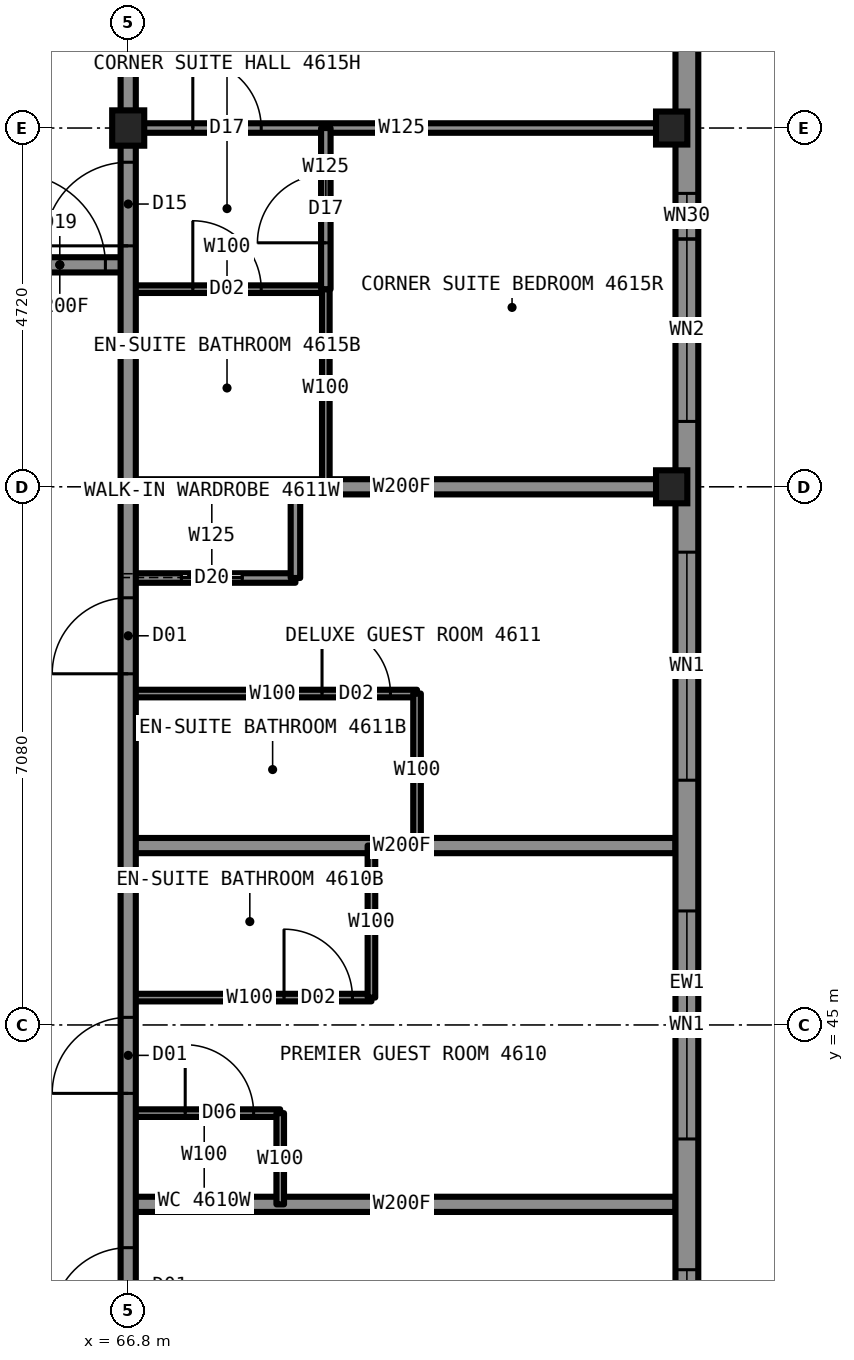
"""IFC4 building model, lengths in metres.
Left out: names, types, materials, properties, quantities, classifications, styles, units other than length and angle.
Written with IfcOpenShell. Run it as: python <this file> out.ifc"""

import sys

from ifc_helpers import new_model, si_unit, direction, frame, frame_2d, origin, origin_2d, place, context, subcontext, project, spatial, rectangle, i_section, extrude, element, fill, save


model = new_model("IFC4")
c1 = context("Model", 3, precision=1e-05, world=origin(), true_north=direction((0.0, 1.0)))
c2 = subcontext(c1, "Body", "Model", "MODEL_VIEW")
j1 = project(units=[si_unit("LENGTHUNIT", "METRE"), si_unit("PLANEANGLEUNIT", "RADIAN")], contexts=[c1])
p1 = place(None, origin())
s1 = spatial("IfcSite", under=j1, at=p1, CompositionType="ELEMENT")
p2 = place(p1, origin())
s2 = spatial("IfcBuilding", under=s1, at=p2, CompositionType="ELEMENT")
p3 = place(p2, frame((0.0, 0.0, 172.3)))
s3 = spatial("IfcBuildingStorey", under=s2, at=p3, CompositionType="ELEMENT", Elevation=172.3)
for number, where, z_axis, x_axis in (
    (1, (73.95, 52.08, 0.0), (0.0, 0.0, 1.0), (1.0, 0.0, 0.0)),
    (2, (73.95, 56.8, 0.0), (0.0, 0.0, 1.0), (1.0, 0.0, 0.0)),
):
    element("IfcColumn", number, at=place(p3, frame(where, z_axis=z_axis, x_axis=x_axis)), inside=s3, PredefinedType="COLUMN", context=c2, shape_type="SweptSolid", body=[
        extrude(i_section(OverallWidth=0.411, OverallDepth=0.434, WebThickness=0.036, FlangeThickness=0.057, at=origin_2d()), origin(), (0.0, 0.0, 1.0), 3.5),
    ])
p4 = place(p3, frame((66.8, 56.8, 0.0), z_axis=(0.0, 0.0, 1.0), x_axis=(1.0, 0.0, 0.0)))
e3 = element("IfcColumn", 3, at=p4, inside=s3, PredefinedType="COLUMN", context=c2, shape_type="SweptSolid", body=[
    extrude(i_section(OverallWidth=0.422, OverallDepth=0.465, WebThickness=0.045, FlangeThickness=0.073, at=origin_2d()), origin(), (0.0, 0.0, 1.0), 3.5),
])
p5 = place(p3, frame((66.8, 43.84, 0.0), z_axis=(0.0, 0.0, 1.0), x_axis=(1.0, 0.0, 0.0)))
e4 = element("IfcWall", 4, at=p5, inside=s3, PredefinedType="PARTITIONING", context=c2, shape_type="SweptSolid", body=[
    extrude(rectangle(XDim=2.0, YDim=0.1, at=frame_2d((1.0, 0.0))), origin(), (0.0, 0.0, 1.0), 3.33),
])
p6 = place(p5, frame((0.75, 0.0, 0.0)))
e5 = element("IfcOpeningElement", 5, at=p6, cuts=e4, PredefinedType="OPENING", context=c2, shape_type="SweptSolid", body=[
    extrude(rectangle(XDim=0.9, YDim=2.1, at=frame_2d((0.45, 1.05))), frame((0.0, 0.06, 0.0), z_axis=(0.0, -1.0, 0.0), x_axis=(1.0, 0.0, 0.0)), (0.0, 0.0, 1.0), 0.12),
])
p7 = place(p3, frame((66.8, 42.64, 0.0), z_axis=(0.0, 0.0, 1.0), x_axis=(1.0, 0.0, 0.0)))
e6 = element("IfcWall", 6, at=p7, inside=s3, PredefinedType="PARTITIONING", context=c2, shape_type="SweptSolid", body=[
    extrude(rectangle(XDim=7.2, YDim=0.2, at=frame_2d((3.6, 0.0))), origin(), (0.0, 0.0, 1.0), 2.73),
])
p8 = place(p3, frame((66.8, 45.36, 0.0), z_axis=(0.0, 0.0, 1.0), x_axis=(1.0, 0.0, 0.0)))
e7 = element("IfcWall", 7, at=p8, inside=s3, PredefinedType="PARTITIONING", context=c2, shape_type="SweptSolid", body=[
    extrude(rectangle(XDim=3.2, YDim=0.1, at=frame_2d((1.6, 0.0))), origin(), (0.0, 0.0, 1.0), 3.33),
])
p9 = place(p8, frame((2.05, 0.0, 0.0)))
e8 = element("IfcOpeningElement", 8, at=p9, cuts=e7, PredefinedType="OPENING", context=c2, shape_type="SweptSolid", body=[
    extrude(rectangle(XDim=0.9, YDim=2.1, at=frame_2d((0.45, 1.05))), frame((0.0, 0.06, 0.0), z_axis=(0.0, -1.0, 0.0), x_axis=(1.0, 0.0, 0.0)), (0.0, 0.0, 1.0), 0.12),
])
p10 = place(p3, frame((65.0, 55.0, 0.0), z_axis=(0.0, 0.0, 1.0), x_axis=(1.0, 0.0, 0.0)))
e9 = element("IfcWall", 9, at=p10, inside=s3, PredefinedType="PARTITIONING", context=c2, shape_type="SweptSolid", body=[
    extrude(rectangle(XDim=1.8, YDim=0.2, at=frame_2d((0.9, 0.0))), origin(), (0.0, 0.0, 1.0), 3.33),
])
p11 = place(p10, frame((0.3, 0.0, 0.0)))
e10 = element("IfcOpeningElement", 10, at=p11, cuts=e9, PredefinedType="OPENING", context=c2, shape_type="SweptSolid", body=[
    extrude(rectangle(XDim=1.2, YDim=2.2, at=frame_2d((0.6, 1.1))), frame((0.0, 0.11, 0.0), z_axis=(0.0, -1.0, 0.0), x_axis=(1.0, 0.0, 0.0)), (0.0, 0.0, 1.0), 0.22),
])
p12 = place(p3, frame((66.8, 56.8, 0.0), z_axis=(0.0, 0.0, 1.0), x_axis=(1.0, 0.0, 0.0)))
e11 = element("IfcWall", 11, at=p12, inside=s3, PredefinedType="PARTITIONING", context=c2, shape_type="SweptSolid", body=[
    extrude(rectangle(XDim=7.2, YDim=0.125, at=frame_2d((3.6, 0.0))), origin(), (0.0, 0.0, 1.0), 2.573),
])
p13 = place(p12, frame((0.85, 0.0, 0.0)))
e12 = element("IfcOpeningElement", 12, at=p13, cuts=e11, PredefinedType="OPENING", context=c2, shape_type="SweptSolid", body=[
    extrude(rectangle(XDim=0.9, YDim=2.2, at=frame_2d((0.45, 1.1))), frame((0.0, 0.073, 0.0), z_axis=(0.0, -1.0, 0.0), x_axis=(1.0, 0.0, 0.0)), (0.0, 0.0, 1.0), 0.145),
])
p14 = place(p3, frame((66.8, 47.36, 0.0), z_axis=(0.0, 0.0, 1.0), x_axis=(1.0, 0.0, 0.0)))
e13 = element("IfcWall", 13, at=p14, inside=s3, PredefinedType="PARTITIONING", context=c2, shape_type="SweptSolid", body=[
    extrude(rectangle(XDim=7.2, YDim=0.2, at=frame_2d((3.6, 0.0))), origin(), (0.0, 0.0, 1.0), 2.73),
])
p15 = place(p3, frame((66.8, 49.36, 0.0), z_axis=(0.0, 0.0, 1.0), x_axis=(1.0, 0.0, 0.0)))
e14 = element("IfcWall", 14, at=p15, inside=s3, PredefinedType="PARTITIONING", context=c2, shape_type="SweptSolid", body=[
    extrude(rectangle(XDim=3.8, YDim=0.1, at=frame_2d((1.9, 0.0))), origin(), (0.0, 0.0, 1.0), 3.33),
])
p16 = place(p15, frame((2.55, 0.0, 0.0)))
e15 = element("IfcOpeningElement", 15, at=p16, cuts=e14, PredefinedType="OPENING", context=c2, shape_type="SweptSolid", body=[
    extrude(rectangle(XDim=0.9, YDim=2.1, at=frame_2d((0.45, 1.05))), frame((0.0, 0.06, 0.0), z_axis=(0.0, -1.0, 0.0), x_axis=(1.0, 0.0, 0.0)), (0.0, 0.0, 1.0), 0.12),
])
p17 = place(p3, frame((66.8, 50.88, 0.0), z_axis=(0.0, 0.0, 1.0), x_axis=(1.0, 0.0, 0.0)))
e16 = element("IfcWall", 16, at=p17, inside=s3, PredefinedType="PARTITIONING", context=c2, shape_type="SweptSolid", body=[
    extrude(rectangle(XDim=2.2, YDim=0.125, at=frame_2d((1.1, 0.0))), origin(), (0.0, 0.0, 1.0), 3.33),
])
p18 = place(p17, frame((0.7, 0.0, 0.0)))
e17 = element("IfcOpeningElement", 17, at=p18, cuts=e16, PredefinedType="OPENING", context=c2, shape_type="SweptSolid", body=[
    extrude(rectangle(XDim=0.8, YDim=2.1, at=frame_2d((0.4, 1.05))), frame((0.0, 0.073, 0.0), z_axis=(0.0, -1.0, 0.0), x_axis=(1.0, 0.0, 0.0)), (0.0, 0.0, 1.0), 0.145),
])
p19 = place(p3, frame((66.8, 52.08, 0.0), z_axis=(0.0, 0.0, 1.0), x_axis=(1.0, 0.0, 0.0)))
e18 = element("IfcWall", 18, at=p19, inside=s3, PredefinedType="PARTITIONING", context=c2, shape_type="SweptSolid", body=[
    extrude(rectangle(XDim=7.2, YDim=0.2, at=frame_2d((3.6, 0.0))), origin(), (0.0, 0.0, 1.0), 2.573),
])
p20 = place(p3, frame((66.8, 54.68, 0.0), z_axis=(0.0, 0.0, 1.0), x_axis=(1.0, 0.0, 0.0)))
e19 = element("IfcWall", 19, at=p20, inside=s3, PredefinedType="PARTITIONING", context=c2, shape_type="SweptSolid", body=[
    extrude(rectangle(XDim=2.6, YDim=0.1, at=frame_2d((1.3, 0.0))), origin(), (0.0, 0.0, 1.0), 3.33),
])
p21 = place(p20, frame((0.85, 0.0, 0.0)))
e20 = element("IfcOpeningElement", 20, at=p21, cuts=e19, PredefinedType="OPENING", context=c2, shape_type="SweptSolid", body=[
    extrude(rectangle(XDim=0.9, YDim=2.1, at=frame_2d((0.45, 1.05))), frame((0.0, 0.06, 0.0), z_axis=(0.0, -1.0, 0.0), x_axis=(1.0, 0.0, 0.0)), (0.0, 0.0, 1.0), 0.12),
])
p22 = place(p3, frame((66.8, 33.2, 0.0), z_axis=(0.0, 0.0, 1.0), x_axis=(0.0, 1.0, 0.0)))
e21 = element("IfcWall", 21, at=p22, inside=s3, PredefinedType="PARTITIONING", context=c2, shape_type="SweptSolid", body=[
    extrude(rectangle(XDim=23.58, YDim=0.2, at=frame_2d((11.79, 0.0))), origin(), (0.0, 0.0, 1.0), 3.33),
])
p23 = place(p22, frame((7.87, 0.0, 0.0)))
e22 = element("IfcOpeningElement", 22, at=p23, cuts=e21, PredefinedType="OPENING", context=c2, shape_type="SweptSolid", body=[
    extrude(rectangle(XDim=1.0, YDim=2.2, at=frame_2d((0.5, 1.1))), frame((0.0, 0.11, 0.0), z_axis=(0.0, -1.0, 0.0), x_axis=(1.0, 0.0, 0.0)), (0.0, 0.0, 1.0), 0.22),
])
p24 = place(p22, frame((10.9, 0.0, 0.0)))
e23 = element("IfcOpeningElement", 23, at=p24, cuts=e21, PredefinedType="OPENING", context=c2, shape_type="SweptSolid", body=[
    extrude(rectangle(XDim=1.0, YDim=2.2, at=frame_2d((0.5, 1.1))), frame((0.0, 0.11, 0.0), z_axis=(0.0, -1.0, 0.0), x_axis=(1.0, 0.0, 0.0)), (0.0, 0.0, 1.0), 0.22),
])
p25 = place(p22, frame((16.42, 0.0, 0.0)))
e24 = element("IfcOpeningElement", 24, at=p25, cuts=e21, PredefinedType="OPENING", context=c2, shape_type="SweptSolid", body=[
    extrude(rectangle(XDim=1.0, YDim=2.2, at=frame_2d((0.5, 1.1))), frame((0.0, 0.11, 0.0), z_axis=(0.0, -1.0, 0.0), x_axis=(1.0, 0.0, 0.0)), (0.0, 0.0, 1.0), 0.22),
])
p26 = place(p22, frame((22.05, 0.0, 0.0)))
e25 = element("IfcOpeningElement", 25, at=p26, cuts=e21, PredefinedType="OPENING", context=c2, shape_type="SweptSolid", body=[
    extrude(rectangle(XDim=1.1, YDim=2.2, at=frame_2d((0.55, 1.1))), frame((0.0, 0.11, 0.0), z_axis=(0.0, -1.0, 0.0), x_axis=(1.0, 0.0, 0.0)), (0.0, 0.0, 1.0), 0.22),
])
p27 = place(p22, frame((0.65, 0.0, 0.0)))
e26 = element("IfcOpeningElement", 26, at=p27, cuts=e21, PredefinedType="OPENING", context=c2, shape_type="SweptSolid", body=[
    extrude(rectangle(XDim=1.1, YDim=2.2, at=frame_2d((0.55, 1.1))), frame((0.0, 0.11, 0.0), z_axis=(0.0, -1.0, 0.0), x_axis=(1.0, 0.0, 0.0)), (0.0, 0.0, 1.0), 0.22),
])
p28 = place(p3, frame((68.8, 42.64, 0.0), z_axis=(0.0, 0.0, 1.0), x_axis=(0.0, 1.0, 0.0)))
e27 = element("IfcWall", 27, at=p28, inside=s3, PredefinedType="PARTITIONING", context=c2, shape_type="SweptSolid", body=[
    extrude(rectangle(XDim=1.2, YDim=0.1, at=frame_2d((0.6, 0.0))), origin(), (0.0, 0.0, 1.0), 3.33),
])
p29 = place(p3, frame((69.0, 50.88, 0.0), z_axis=(0.0, 0.0, 1.0), x_axis=(0.0, 1.0, 0.0)))
e28 = element("IfcWall", 28, at=p29, inside=s3, PredefinedType="PARTITIONING", context=c2, shape_type="SweptSolid", body=[
    extrude(rectangle(XDim=1.2, YDim=0.125, at=frame_2d((0.6, 0.0))), origin(), (0.0, 0.0, 1.0), 3.33),
])
p30 = place(p3, frame((69.4, 52.08, 0.0), z_axis=(0.0, 0.0, 1.0), x_axis=(0.0, 1.0, 0.0)))
e29 = element("IfcWall", 29, at=p30, inside=s3, PredefinedType="PARTITIONING", context=c2, shape_type="SweptSolid", body=[
    extrude(rectangle(XDim=2.6, YDim=0.1, at=frame_2d((1.3, 0.0))), origin(), (0.0, 0.0, 1.0), 3.33),
])
p31 = place(p3, frame((69.4, 54.68, 0.0), z_axis=(0.0, 0.0, 1.0), x_axis=(0.0, 1.0, 0.0)))
e30 = element("IfcWall", 30, at=p31, inside=s3, PredefinedType="PARTITIONING", context=c2, shape_type="SweptSolid", body=[
    extrude(rectangle(XDim=2.12, YDim=0.125, at=frame_2d((1.06, 0.0))), origin(), (0.0, 0.0, 1.0), 3.33),
])
p32 = place(p31, frame((0.61, 0.0, 0.0)))
e31 = element("IfcOpeningElement", 31, at=p32, cuts=e30, PredefinedType="OPENING", context=c2, shape_type="SweptSolid", body=[
    extrude(rectangle(XDim=0.9, YDim=2.2, at=frame_2d((0.45, 1.1))), frame((0.0, 0.073, 0.0), z_axis=(0.0, -1.0, 0.0), x_axis=(1.0, 0.0, 0.0)), (0.0, 0.0, 1.0), 0.145),
])
for number, where, z_axis, x_axis in (
    (32, (70.0, 45.36, 0.0), (0.0, 0.0, 1.0), (0.0, 1.0, 0.0)),
    (33, (70.6, 47.36, 0.0), (0.0, 0.0, 1.0), (0.0, 1.0, 0.0)),
):
    element("IfcWall", number, at=place(p3, frame(where, z_axis=z_axis, x_axis=x_axis)), inside=s3, PredefinedType="PARTITIONING", context=c2, shape_type="SweptSolid", body=[
        extrude(rectangle(XDim=2.0, YDim=0.1, at=frame_2d((1.0, 0.0))), origin(), (0.0, 0.0, 1.0), 3.33),
    ])
p33 = place(p3, frame((74.15, 31.2, 0.0), z_axis=(0.0, 0.0, 1.0), x_axis=(0.0, 1.0, 0.0)))
e34 = element("IfcWall", 34, at=p33, inside=s3, PredefinedType="SOLIDWALL", context=c2, shape_type="SweptSolid", body=[
    extrude(rectangle(XDim=27.6, YDim=0.3, at=frame_2d((13.8, 0.0))), origin(), (0.0, 0.0, 1.0), 2.83),
])
p34 = place(p33, frame((3.46, 0.0, 0.3)))
e35 = element("IfcOpeningElement", 35, at=p34, cuts=e34, PredefinedType="OPENING", context=c2, shape_type="SweptSolid", body=[
    extrude(rectangle(XDim=2.4, YDim=2.0, at=frame_2d((1.2, 1.0))), frame((0.0, 0.16, 0.0), z_axis=(0.0, -1.0, 0.0), x_axis=(1.0, 0.0, 0.0)), (0.0, 0.0, 1.0), 0.32),
])
p35 = place(p33, frame((7.58, 0.0, 0.3)))
e36 = element("IfcOpeningElement", 36, at=p35, cuts=e34, PredefinedType="OPENING", context=c2, shape_type="SweptSolid", body=[
    extrude(rectangle(XDim=3.0, YDim=2.0, at=frame_2d((1.5, 1.0))), frame((0.0, 0.16, 0.0), z_axis=(0.0, -1.0, 0.0), x_axis=(1.0, 0.0, 0.0)), (0.0, 0.0, 1.0), 0.32),
])
p36 = place(p33, frame((12.3, 0.0, 0.3)))
e37 = element("IfcOpeningElement", 37, at=p36, cuts=e34, PredefinedType="OPENING", context=c2, shape_type="SweptSolid", body=[
    extrude(rectangle(XDim=3.0, YDim=2.0, at=frame_2d((1.5, 1.0))), frame((0.0, 0.16, 0.0), z_axis=(0.0, -1.0, 0.0), x_axis=(1.0, 0.0, 0.0)), (0.0, 0.0, 1.0), 0.32),
])
p37 = place(p33, frame((17.02, 0.0, 0.3)))
e38 = element("IfcOpeningElement", 38, at=p37, cuts=e34, PredefinedType="OPENING", context=c2, shape_type="SweptSolid", body=[
    extrude(rectangle(XDim=3.0, YDim=2.0, at=frame_2d((1.5, 1.0))), frame((0.0, 0.16, 0.0), z_axis=(0.0, -1.0, 0.0), x_axis=(1.0, 0.0, 0.0)), (0.0, 0.0, 1.0), 0.32),
])
p38 = place(p33, frame((21.74, 0.0, 0.3)))
e39 = element("IfcOpeningElement", 39, at=p38, cuts=e34, PredefinedType="OPENING", context=c2, shape_type="SweptSolid", body=[
    extrude(rectangle(XDim=2.4, YDim=2.0, at=frame_2d((1.2, 1.0))), frame((0.0, 0.16, 0.0), z_axis=(0.0, -1.0, 0.0), x_axis=(1.0, 0.0, 0.0)), (0.0, 0.0, 1.0), 0.32),
])
p39 = place(p33, frame((2.86, 0.0, 0.3)))
e40 = element("IfcOpeningElement", 40, at=p39, cuts=e34, PredefinedType="OPENING", context=c2, shape_type="SweptSolid", body=[
    extrude(rectangle(XDim=0.6, YDim=1.1, at=frame_2d((0.3, 0.55))), frame((0.0, 0.16, 0.0), z_axis=(0.0, -1.0, 0.0), x_axis=(1.0, 0.0, 0.0)), (0.0, 0.0, 1.0), 0.32),
])
p40 = place(p33, frame((24.14, 0.0, 0.3)))
e41 = element("IfcOpeningElement", 41, at=p40, cuts=e34, PredefinedType="OPENING", context=c2, shape_type="SweptSolid", body=[
    extrude(rectangle(XDim=0.6, YDim=1.1, at=frame_2d((0.3, 0.55))), frame((0.0, 0.16, 0.0), z_axis=(0.0, -1.0, 0.0), x_axis=(1.0, 0.0, 0.0)), (0.0, 0.0, 1.0), 0.32),
])
p41 = place(p3, frame((66.8, 56.78, 0.0), z_axis=(0.0, 0.0, 1.0), x_axis=(0.0, 1.0, 0.0)))
e42 = element("IfcWall", 42, at=p41, inside=s3, PredefinedType="PARTITIONING", context=c2, shape_type="SweptSolid", body=[
    extrude(rectangle(XDim=2.82, YDim=0.2, at=frame_2d((1.41, 0.0))), origin(), (0.0, 0.0, 1.0), 2.573),
])
p42 = place(p11, origin())
e43 = element("IfcDoor", 43, at=p42, inside=s3, OperationType="SINGLE_SWING_LEFT", PredefinedType="DOOR", context=c2, shape_type="SweptSolid", body=[
    extrude(rectangle(XDim=1.2, YDim=2.2, at=frame_2d((0.6, 1.1))), frame((0.0, 0.025, 0.0), z_axis=(0.0, -1.0, 0.0), x_axis=(1.0, 0.0, 0.0)), (0.0, 0.0, 1.0), 0.05),
])
fill(e10, e43)
p43 = place(p23, origin())
e44 = element("IfcDoor", 44, at=p43, inside=s3, OperationType="SINGLE_SWING_LEFT", PredefinedType="DOOR", context=c2, shape_type="SweptSolid", body=[
    extrude(rectangle(XDim=1.0, YDim=2.2, at=frame_2d((0.5, 1.1))), frame((0.0, 0.025, 0.0), z_axis=(0.0, -1.0, 0.0), x_axis=(1.0, 0.0, 0.0)), (0.0, 0.0, 1.0), 0.05),
])
fill(e22, e44)
p44 = place(p24, origin())
e45 = element("IfcDoor", 45, at=p44, inside=s3, OperationType="SINGLE_SWING_LEFT", PredefinedType="DOOR", context=c2, shape_type="SweptSolid", body=[
    extrude(rectangle(XDim=1.0, YDim=2.2, at=frame_2d((0.5, 1.1))), frame((0.0, 0.025, 0.0), z_axis=(0.0, -1.0, 0.0), x_axis=(1.0, 0.0, 0.0)), (0.0, 0.0, 1.0), 0.05),
])
fill(e23, e45)
p45 = place(p9, origin())
e46 = element("IfcDoor", 46, at=p45, inside=s3, OperationType="SINGLE_SWING_RIGHT", PredefinedType="DOOR", context=c2, shape_type="SweptSolid", body=[
    extrude(rectangle(XDim=0.9, YDim=2.1, at=frame_2d((0.45, 1.05))), frame((0.0, 0.025, 0.0), z_axis=(0.0, -1.0, 0.0), x_axis=(1.0, 0.0, 0.0)), (0.0, 0.0, 1.0), 0.05),
])
fill(e8, e46)
p46 = place(p6, origin())
e47 = element("IfcDoor", 47, at=p46, inside=s3, OperationType="SINGLE_SWING_LEFT", PredefinedType="DOOR", context=c2, shape_type="SweptSolid", body=[
    extrude(rectangle(XDim=0.9, YDim=2.1, at=frame_2d((0.45, 1.05))), frame((0.0, 0.025, 0.0), z_axis=(0.0, -1.0, 0.0), x_axis=(1.0, 0.0, 0.0)), (0.0, 0.0, 1.0), 0.05),
])
fill(e5, e47)
p47 = place(p25, origin())
e48 = element("IfcDoor", 48, at=p47, inside=s3, OperationType="SINGLE_SWING_LEFT", PredefinedType="DOOR", context=c2, shape_type="SweptSolid", body=[
    extrude(rectangle(XDim=1.0, YDim=2.2, at=frame_2d((0.5, 1.1))), frame((0.0, 0.025, 0.0), z_axis=(0.0, -1.0, 0.0), x_axis=(1.0, 0.0, 0.0)), (0.0, 0.0, 1.0), 0.05),
])
fill(e24, e48)
p48 = place(p16, origin())
e49 = element("IfcDoor", 49, at=p48, inside=s3, OperationType="SINGLE_SWING_RIGHT", PredefinedType="DOOR", context=c2, shape_type="SweptSolid", body=[
    extrude(rectangle(XDim=0.9, YDim=2.1, at=frame_2d((0.45, 1.05))), frame((0.0, 0.025, 0.0), z_axis=(0.0, -1.0, 0.0), x_axis=(1.0, 0.0, 0.0)), (0.0, 0.0, 1.0), 0.05),
])
fill(e15, e49)
p49 = place(p18, origin())
e50 = element("IfcDoor", 50, at=p49, inside=s3, OperationType="SLIDING_TO_LEFT", PredefinedType="DOOR", context=c2, shape_type="SweptSolid", body=[
    extrude(rectangle(XDim=0.8, YDim=2.1, at=frame_2d((0.4, 1.05))), frame((0.0, 0.025, 0.0), z_axis=(0.0, -1.0, 0.0), x_axis=(1.0, 0.0, 0.0)), (0.0, 0.0, 1.0), 0.05),
])
fill(e17, e50)
p50 = place(p13, origin())
e51 = element("IfcDoor", 51, at=p50, inside=s3, OperationType="SINGLE_SWING_LEFT", PredefinedType="DOOR", context=c2, shape_type="SweptSolid", body=[
    extrude(rectangle(XDim=0.9, YDim=2.2, at=frame_2d((0.45, 1.1))), frame((0.0, 0.025, 0.0), z_axis=(0.0, -1.0, 0.0), x_axis=(1.0, 0.0, 0.0)), (0.0, 0.0, 1.0), 0.05),
])
fill(e12, e51)
p51 = place(p21, origin())
e52 = element("IfcDoor", 52, at=p51, inside=s3, OperationType="SINGLE_SWING_RIGHT", PredefinedType="DOOR", context=c2, shape_type="SweptSolid", body=[
    extrude(rectangle(XDim=0.9, YDim=2.1, at=frame_2d((0.45, 1.05))), frame((0.0, 0.025, 0.0), z_axis=(0.0, -1.0, 0.0), x_axis=(1.0, 0.0, 0.0)), (0.0, 0.0, 1.0), 0.05),
])
fill(e20, e52)
p52 = place(p26, origin())
e53 = element("IfcDoor", 53, at=p52, inside=s3, OperationType="SINGLE_SWING_LEFT", PredefinedType="DOOR", context=c2, shape_type="SweptSolid", body=[
    extrude(rectangle(XDim=1.1, YDim=2.2, at=frame_2d((0.55, 1.1))), frame((0.0, 0.025, 0.0), z_axis=(0.0, -1.0, 0.0), x_axis=(1.0, 0.0, 0.0)), (0.0, 0.0, 1.0), 0.05),
])
fill(e25, e53)
p53 = place(p32, origin())
e54 = element("IfcDoor", 54, at=p53, inside=s3, OperationType="SINGLE_SWING_LEFT", PredefinedType="DOOR", context=c2, shape_type="SweptSolid", body=[
    extrude(rectangle(XDim=0.9, YDim=2.2, at=frame_2d((0.45, 1.1))), frame((0.0, 0.025, 0.0), z_axis=(0.0, -1.0, 0.0), x_axis=(1.0, 0.0, 0.0)), (0.0, 0.0, 1.0), 0.05),
])
fill(e31, e54)
p54 = place(p35, origin())
e55 = element("IfcWindow", 55, at=p54, inside=s3, PartitioningType="SINGLE_PANEL", PredefinedType="WINDOW", context=c2, shape_type="SweptSolid", body=[
    extrude(rectangle(XDim=3.0, YDim=2.0, at=frame_2d((1.5, 1.0))), frame((0.0, 0.13, 0.0), z_axis=(0.0, -1.0, 0.0), x_axis=(1.0, 0.0, 0.0)), (0.0, 0.0, 1.0), 0.06),
])
fill(e36, e55)
p55 = place(p36, origin())
e56 = element("IfcWindow", 56, at=p55, inside=s3, PartitioningType="SINGLE_PANEL", PredefinedType="WINDOW", context=c2, shape_type="SweptSolid", body=[
    extrude(rectangle(XDim=3.0, YDim=2.0, at=frame_2d((1.5, 1.0))), frame((0.0, 0.13, 0.0), z_axis=(0.0, -1.0, 0.0), x_axis=(1.0, 0.0, 0.0)), (0.0, 0.0, 1.0), 0.06),
])
fill(e37, e56)
p56 = place(p37, origin())
e57 = element("IfcWindow", 57, at=p56, inside=s3, PartitioningType="SINGLE_PANEL", PredefinedType="WINDOW", context=c2, shape_type="SweptSolid", body=[
    extrude(rectangle(XDim=3.0, YDim=2.0, at=frame_2d((1.5, 1.0))), frame((0.0, 0.13, 0.0), z_axis=(0.0, -1.0, 0.0), x_axis=(1.0, 0.0, 0.0)), (0.0, 0.0, 1.0), 0.06),
])
fill(e38, e57)
p57 = place(p38, origin())
e58 = element("IfcWindow", 58, at=p57, inside=s3, PartitioningType="SINGLE_PANEL", PredefinedType="WINDOW", context=c2, shape_type="SweptSolid", body=[
    extrude(rectangle(XDim=2.4, YDim=2.0, at=frame_2d((1.2, 1.0))), frame((0.0, 0.13, 0.0), z_axis=(0.0, -1.0, 0.0), x_axis=(1.0, 0.0, 0.0)), (0.0, 0.0, 1.0), 0.06),
])
fill(e39, e58)
p58 = place(p40, origin())
e59 = element("IfcWindow", 59, at=p58, inside=s3, PartitioningType="SINGLE_PANEL", PredefinedType="WINDOW", context=c2, shape_type="SweptSolid", body=[
    extrude(rectangle(XDim=0.6, YDim=1.1, at=frame_2d((0.3, 0.55))), frame((0.0, 0.13, 0.0), z_axis=(0.0, -1.0, 0.0), x_axis=(1.0, 0.0, 0.0)), (0.0, 0.0, 1.0), 0.06),
])
fill(e41, e59)
save(model, sys.argv[1])
